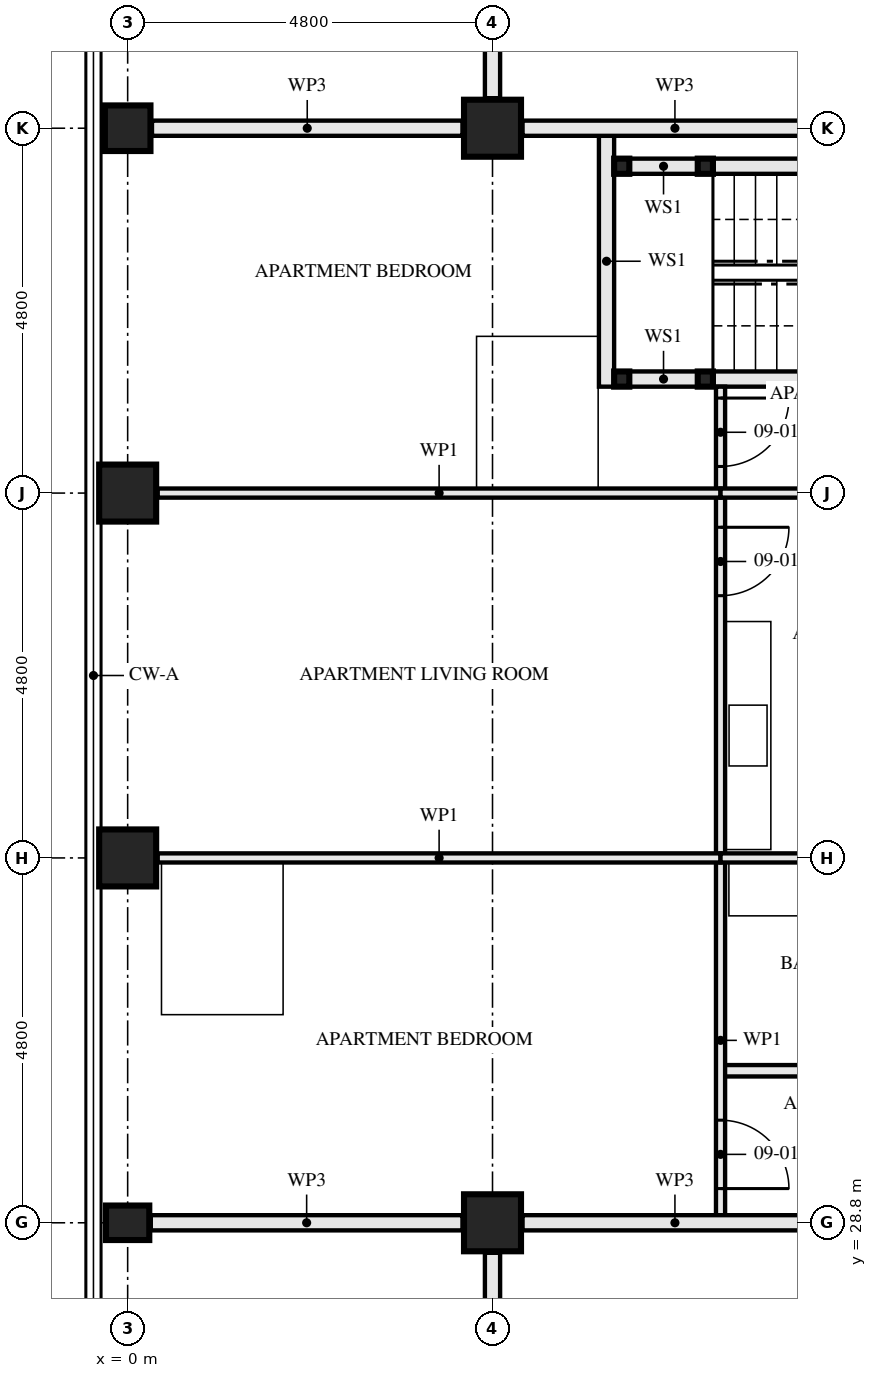
"""IFC4 building model, lengths in metres.
Left out: names, types, materials, properties, quantities, classifications, styles, units other than length and angle.
Written with IfcOpenShell. Run it as: python <this file> out.ifc"""

import sys

from ifc_helpers import new_model, si_unit, direction, frame, frame_2d, origin, origin_2d, place, context, subcontext, project, spatial, rectangle, hollow_rectangle, i_section, extrude, element, fill, save


model = new_model("IFC4")
c1 = context("Model", 3, precision=1e-05, world=origin(), true_north=direction((0.0, 1.0)))
c2 = subcontext(c1, "Body", "Model", "MODEL_VIEW")
j1 = project(units=[si_unit("LENGTHUNIT", "METRE"), si_unit("PLANEANGLEUNIT", "RADIAN")], contexts=[c1])
p1 = place(None, origin())
s1 = spatial("IfcSite", under=j1, at=p1, CompositionType="ELEMENT")
p2 = place(p1, origin())
s2 = spatial("IfcBuilding", under=s1, at=p2, CompositionType="ELEMENT")
p3 = place(p2, frame((0.0, 0.0, 37.5)))
s3 = spatial("IfcBuildingStorey", under=s2, at=p3, CompositionType="ELEMENT", Elevation=37.5)
p4 = place(p3, frame((0.0, 28.8, 0.0), z_axis=(0.0, 0.0, 1.0), x_axis=(0.0, 1.0, 0.0)))
e1 = element("IfcColumn", 1, at=p4, inside=s3, PredefinedType="COLUMN", context=c2, shape_type="SweptSolid", body=[
    extrude(i_section(OverallWidth=0.454, OverallDepth=0.569, WebThickness=0.078, FlangeThickness=0.125, FilletRadius=0.015, at=origin_2d()), origin(), (0.0, 0.0, 1.0), 3.5),
])
for number, where, z_axis, x_axis in (
    (2, (0.0, 33.6, 0.0), (0.0, 0.0, 1.0), (1.0, 0.0, 0.0)),
    (3, (0.0, 38.4, 0.0), (0.0, 0.0, 1.0), (1.0, 0.0, 0.0)),
):
    element("IfcColumn", number, at=place(p3, frame(where, z_axis=z_axis, x_axis=x_axis)), inside=s3, PredefinedType="COLUMN", context=c2, shape_type="SweptSolid", body=[
        extrude(hollow_rectangle(XDim=0.75, YDim=0.75, WallThickness=0.08, at=origin_2d()), origin(), (0.0, 0.0, 1.0), 3.5),
    ])
p5 = place(p3, frame((0.0, 43.2, 0.0), z_axis=(0.0, 0.0, 1.0), x_axis=(0.0, 1.0, 0.0)))
e4 = element("IfcColumn", 4, at=p5, inside=s3, PredefinedType="COLUMN", context=c2, shape_type="SweptSolid", body=[
    extrude(hollow_rectangle(XDim=0.6, YDim=0.6, WallThickness=0.08, at=origin_2d()), origin(), (0.0, 0.0, 1.0), 3.5),
])
for number, where, z_axis, x_axis in (
    (5, (4.8, 28.8, 0.0), (0.0, 0.0, 1.0), (0.0, 1.0, 0.0)),
    (6, (4.8, 43.2, 0.0), (0.0, 0.0, 1.0), (0.0, 1.0, 0.0)),
):
    element("IfcColumn", number, at=place(p3, frame(where, z_axis=z_axis, x_axis=x_axis)), inside=s3, PredefinedType="COLUMN", context=c2, shape_type="SweptSolid", body=[
        extrude(hollow_rectangle(XDim=0.75, YDim=0.75, WallThickness=0.08, at=origin_2d()), origin(), (0.0, 0.0, 1.0), 3.5),
    ])
for number, where, z_axis, x_axis in (
    (7, (6.5, 42.7, 0.0), (0.0, 0.0, 1.0), (1.0, 0.0, 0.0)),
    (8, (6.5, 39.9, 0.0), (0.0, 0.0, 1.0), (1.0, 0.0, 0.0)),
    (9, (7.6, 42.7, 0.0), (0.0, 0.0, 1.0), (1.0, 0.0, 0.0)),
    (10, (7.6, 39.9, 0.0), (0.0, 0.0, 1.0), (1.0, 0.0, 0.0)),
):
    element("IfcColumn", number, at=place(p3, frame(where, z_axis=z_axis, x_axis=x_axis)), inside=s3, PredefinedType="COLUMN", context=c2, shape_type="SweptSolid", body=[
        extrude(hollow_rectangle(XDim=0.2, YDim=0.2, WallThickness=0.008, at=origin_2d()), origin(), (0.0, 0.0, 1.0), 3.33),
    ])
p6 = place(p3, frame((4.8, 26.8, 0.0), z_axis=(0.0, 0.0, 1.0), x_axis=(0.0, 1.0, 0.0)))
e11 = element("IfcWall", 11, at=p6, inside=s3, PredefinedType="PARTITIONING", context=c2, shape_type="SweptSolid", body=[
    extrude(rectangle(XDim=1.605, YDim=0.2, at=frame_2d((0.802, 0.0))), origin(), (0.0, 0.0, 1.0), 3.33),
])
p7 = place(p3, frame((6.6, 42.7, 0.0), z_axis=(0.0, 0.0, 1.0), x_axis=(1.0, 0.0, 0.0)))
e12 = element("IfcWall", 12, at=p7, inside=s3, PredefinedType="SOLIDWALL", context=c2, shape_type="SweptSolid", body=[
    extrude(rectangle(XDim=0.9, YDim=0.2, at=frame_2d((0.45, 0.0))), origin(), (0.0, 0.0, 1.0), 2.99),
])
p8 = place(p3, frame((7.7, 42.7, 0.0), z_axis=(0.0, 0.0, 1.0), x_axis=(1.0, 0.0, 0.0)))
e13 = element("IfcWall", 13, at=p8, inside=s3, PredefinedType="SOLIDWALL", context=c2, shape_type="SweptSolid", body=[
    extrude(rectangle(XDim=4.7, YDim=0.2, at=frame_2d((2.35, 0.0))), origin(), (0.0, 0.0, 1.0), 2.99),
])
p9 = place(p3, frame((6.6, 39.9, 0.0), z_axis=(0.0, 0.0, 1.0), x_axis=(1.0, 0.0, 0.0)))
e14 = element("IfcWall", 14, at=p9, inside=s3, PredefinedType="SOLIDWALL", context=c2, shape_type="SweptSolid", body=[
    extrude(rectangle(XDim=0.9, YDim=0.2, at=frame_2d((0.45, 0.0))), origin(), (0.0, 0.0, 1.0), 2.99),
])
p10 = place(p3, frame((7.7, 39.9, 0.0), z_axis=(0.0, 0.0, 1.0), x_axis=(1.0, 0.0, 0.0)))
e15 = element("IfcWall", 15, at=p10, inside=s3, PredefinedType="SOLIDWALL", context=c2, shape_type="SweptSolid", body=[
    extrude(rectangle(XDim=4.7, YDim=0.2, at=frame_2d((2.35, 0.0))), origin(), (0.0, 0.0, 1.0), 2.99),
])
p11 = place(p3, frame((6.3, 43.1, 0.0), z_axis=(0.0, 0.0, 1.0), x_axis=(0.0, -1.0, 0.0)))
e16 = element("IfcWall", 16, at=p11, inside=s3, PredefinedType="SOLIDWALL", context=c2, shape_type="SweptSolid", body=[
    extrude(rectangle(XDim=3.3, YDim=0.2, at=frame_2d((1.65, 0.0))), origin(), (0.0, 0.0, 1.0), 3.33),
])
p12 = place(p3, frame((7.8, 30.8, 0.0), z_axis=(0.0, 0.0, 1.0), x_axis=(1.0, 0.0, 0.0)))
e17 = element("IfcWall", 17, at=p12, inside=s3, PredefinedType="PARTITIONING", context=c2, shape_type="SweptSolid", body=[
    extrude(rectangle(XDim=3.0, YDim=0.15, at=frame_2d((1.5, 0.0))), origin(), (0.0, 0.0, 1.0), 3.33),
])
p13 = place(p12, frame((1.05, 0.0, 0.0)))
e18 = element("IfcOpeningElement", 18, at=p13, cuts=e17, PredefinedType="OPENING", context=c2, shape_type="SweptSolid", body=[
    extrude(rectangle(XDim=0.9, YDim=2.1, at=frame_2d((0.45, 1.05))), frame((0.0, 0.085, 0.0), z_axis=(0.0, -1.0, 0.0), x_axis=(1.0, 0.0, 0.0)), (0.0, 0.0, 1.0), 0.171),
])
p14 = place(p3, frame((7.8, 38.4, 0.0), z_axis=(0.0, 0.0, 1.0), x_axis=(1.0, 0.0, 0.0)))
e19 = element("IfcWall", 19, at=p14, inside=s3, PredefinedType="PARTITIONING", context=c2, shape_type="SweptSolid", body=[
    extrude(rectangle(XDim=4.65, YDim=0.12, at=frame_2d((2.325, 0.0))), origin(), (0.0, 0.0, 1.0), 2.55),
])
p15 = place(p14, frame((1.875, 0.0, 0.0)))
e20 = element("IfcOpeningElement", 20, at=p15, cuts=e19, PredefinedType="OPENING", context=c2, shape_type="SweptSolid", body=[
    extrude(rectangle(XDim=0.9, YDim=2.1, at=frame_2d((0.45, 1.05))), frame((0.0, 0.071, 0.0), z_axis=(0.0, -1.0, 0.0), x_axis=(1.0, 0.0, 0.0)), (0.0, 0.0, 1.0), 0.141),
])
p16 = place(p3, frame((7.8, 33.6, 0.0), z_axis=(0.0, 0.0, 1.0), x_axis=(1.0, 0.0, 0.0)))
e21 = element("IfcWall", 21, at=p16, inside=s3, PredefinedType="PARTITIONING", context=c2, shape_type="SweptSolid", body=[
    extrude(rectangle(XDim=4.65, YDim=0.12, at=frame_2d((2.325, 0.0))), origin(), (0.0, 0.0, 1.0), 2.55),
])
p17 = place(p16, frame((3.35, 0.0, 0.0)))
e22 = element("IfcOpeningElement", 22, at=p17, cuts=e21, PredefinedType="OPENING", context=c2, shape_type="SweptSolid", body=[
    extrude(rectangle(XDim=0.9, YDim=2.1, at=frame_2d((0.45, 1.05))), frame((0.0, 0.071, 0.0), z_axis=(0.0, -1.0, 0.0), x_axis=(1.0, 0.0, 0.0)), (0.0, 0.0, 1.0), 0.141),
])
p18 = place(p3, frame((7.8, 39.8, 0.0), z_axis=(0.0, 0.0, 1.0), x_axis=(0.0, -1.0, 0.0)))
e23 = element("IfcWall", 23, at=p18, inside=s3, PredefinedType="PARTITIONING", context=c2, shape_type="SweptSolid", body=[
    extrude(rectangle(XDim=1.4, YDim=0.12, at=frame_2d((0.7, 0.0))), origin(), (0.0, 0.0, 1.0), 3.33),
])
p19 = place(p18, frame((0.15, 0.0, 0.0)))
e24 = element("IfcOpeningElement", 24, at=p19, cuts=e23, PredefinedType="OPENING", context=c2, shape_type="SweptSolid", body=[
    extrude(rectangle(XDim=0.9, YDim=2.1, at=frame_2d((0.45, 1.05))), frame((0.0, 0.071, 0.0), z_axis=(0.0, -1.0, 0.0), x_axis=(1.0, 0.0, 0.0)), (0.0, 0.0, 1.0), 0.141),
])
p20 = place(p3, frame((7.8, 38.4, 0.0), z_axis=(0.0, 0.0, 1.0), x_axis=(0.0, -1.0, 0.0)))
e25 = element("IfcWall", 25, at=p20, inside=s3, PredefinedType="PARTITIONING", context=c2, shape_type="SweptSolid", body=[
    extrude(rectangle(XDim=4.8, YDim=0.12, at=frame_2d((2.4, 0.0))), origin(), (0.0, 0.0, 1.0), 3.33),
])
p21 = place(p20, frame((0.45, 0.0, 0.0)))
e26 = element("IfcOpeningElement", 26, at=p21, cuts=e25, PredefinedType="OPENING", context=c2, shape_type="SweptSolid", body=[
    extrude(rectangle(XDim=0.9, YDim=2.1, at=frame_2d((0.45, 1.05))), frame((0.0, 0.071, 0.0), z_axis=(0.0, -1.0, 0.0), x_axis=(1.0, 0.0, 0.0)), (0.0, 0.0, 1.0), 0.141),
])
p22 = place(p3, frame((7.8, 33.6, 0.0), z_axis=(0.0, 0.0, 1.0), x_axis=(0.0, -1.0, 0.0)))
e27 = element("IfcWall", 27, at=p22, inside=s3, PredefinedType="PARTITIONING", context=c2, shape_type="SweptSolid", body=[
    extrude(rectangle(XDim=4.8, YDim=0.12, at=frame_2d((2.4, 0.0))), origin(), (0.0, 0.0, 1.0), 3.33),
])
p23 = place(p22, frame((3.45, 0.0, 0.0)))
e28 = element("IfcOpeningElement", 28, at=p23, cuts=e27, PredefinedType="OPENING", context=c2, shape_type="SweptSolid", body=[
    extrude(rectangle(XDim=0.9, YDim=2.1, at=frame_2d((0.45, 1.05))), frame((0.0, 0.071, 0.0), z_axis=(0.0, -1.0, 0.0), x_axis=(1.0, 0.0, 0.0)), (0.0, 0.0, 1.0), 0.141),
])
for number, where, z_axis, x_axis in (
    (29, (0.395, 38.4, 0.0), (0.0, 0.0, 1.0), (1.0, 0.0, 0.0)),
    (30, (0.395, 33.6, 0.0), (0.0, 0.0, 1.0), (1.0, 0.0, 0.0)),
):
    element("IfcWall", number, at=place(p3, frame(where, z_axis=z_axis, x_axis=x_axis)), inside=s3, PredefinedType="PARTITIONING", context=c2, shape_type="SweptSolid", body=[
        extrude(rectangle(XDim=7.405, YDim=0.12, at=frame_2d((3.703, 0.0))), origin(), (0.0, 0.0, 1.0), 2.55),
    ])
p24 = place(p3, frame((4.8, 45.2, 0.0), z_axis=(0.0, 0.0, 1.0), x_axis=(0.0, -1.0, 0.0)))
e31 = element("IfcWall", 31, at=p24, inside=s3, PredefinedType="PARTITIONING", context=c2, shape_type="SweptSolid", body=[
    extrude(rectangle(XDim=1.605, YDim=0.2, at=frame_2d((0.802, 0.0))), origin(), (0.0, 0.0, 1.0), 3.33),
])
p25 = place(p3, frame((9.205, 28.8, 0.0), z_axis=(0.0, 0.0, 1.0), x_axis=(-1.0, 0.0, 0.0)))
e32 = element("IfcWall", 32, at=p25, inside=s3, PredefinedType="PARTITIONING", context=c2, shape_type="SweptSolid", body=[
    extrude(rectangle(XDim=4.01, YDim=0.2, at=frame_2d((2.005, 0.0))), origin(), (0.0, 0.0, 1.0), 2.32),
])
p26 = place(p3, frame((4.405, 28.8, 0.0), z_axis=(0.0, 0.0, 1.0), x_axis=(-1.0, 0.0, 0.0)))
e33 = element("IfcWall", 33, at=p26, inside=s3, PredefinedType="PARTITIONING", context=c2, shape_type="SweptSolid", body=[
    extrude(rectangle(XDim=4.101, YDim=0.2, at=frame_2d((2.05, 0.0))), origin(), (0.0, 0.0, 1.0), 2.32),
])
p27 = place(p3, frame((9.205, 43.2, 0.0), z_axis=(0.0, 0.0, 1.0), x_axis=(-1.0, 0.0, 0.0)))
e34 = element("IfcWall", 34, at=p27, inside=s3, PredefinedType="PARTITIONING", context=c2, shape_type="SweptSolid", body=[
    extrude(rectangle(XDim=4.01, YDim=0.2, at=frame_2d((2.005, 0.0))), origin(), (0.0, 0.0, 1.0), 2.32),
])
p28 = place(p3, frame((4.405, 43.2, 0.0), z_axis=(0.0, 0.0, 1.0), x_axis=(-1.0, 0.0, 0.0)))
e35 = element("IfcWall", 35, at=p28, inside=s3, PredefinedType="PARTITIONING", context=c2, shape_type="SweptSolid", body=[
    extrude(rectangle(XDim=4.085, YDim=0.2, at=frame_2d((2.042, 0.0))), origin(), (0.0, 0.0, 1.0), 2.32),
])
p29 = place(p19, origin())
e36 = element("IfcDoor", 36, at=p29, inside=s3, OperationType="SINGLE_SWING_RIGHT", PredefinedType="DOOR", context=c2, shape_type="SweptSolid", body=[
    extrude(rectangle(XDim=0.9, YDim=2.1, at=frame_2d((0.45, 1.05))), frame((0.0, 0.022, 0.0), z_axis=(0.0, -1.0, 0.0), x_axis=(1.0, 0.0, 0.0)), (0.0, 0.0, 1.0), 0.044),
])
fill(e24, e36)
p30 = place(p21, origin())
e37 = element("IfcDoor", 37, at=p30, inside=s3, OperationType="SINGLE_SWING_RIGHT", PredefinedType="DOOR", context=c2, shape_type="SweptSolid", body=[
    extrude(rectangle(XDim=0.9, YDim=2.1, at=frame_2d((0.45, 1.05))), frame((0.0, 0.022, 0.0), z_axis=(0.0, -1.0, 0.0), x_axis=(1.0, 0.0, 0.0)), (0.0, 0.0, 1.0), 0.044),
])
fill(e26, e37)
p31 = place(p23, origin())
e38 = element("IfcDoor", 38, at=p31, inside=s3, OperationType="SINGLE_SWING_LEFT", PredefinedType="DOOR", context=c2, shape_type="SweptSolid", body=[
    extrude(rectangle(XDim=0.9, YDim=2.1, at=frame_2d((0.45, 1.05))), frame((0.0, 0.022, 0.0), z_axis=(0.0, -1.0, 0.0), x_axis=(1.0, 0.0, 0.0)), (0.0, 0.0, 1.0), 0.044),
])
fill(e28, e38)
save(model, sys.argv[1])
